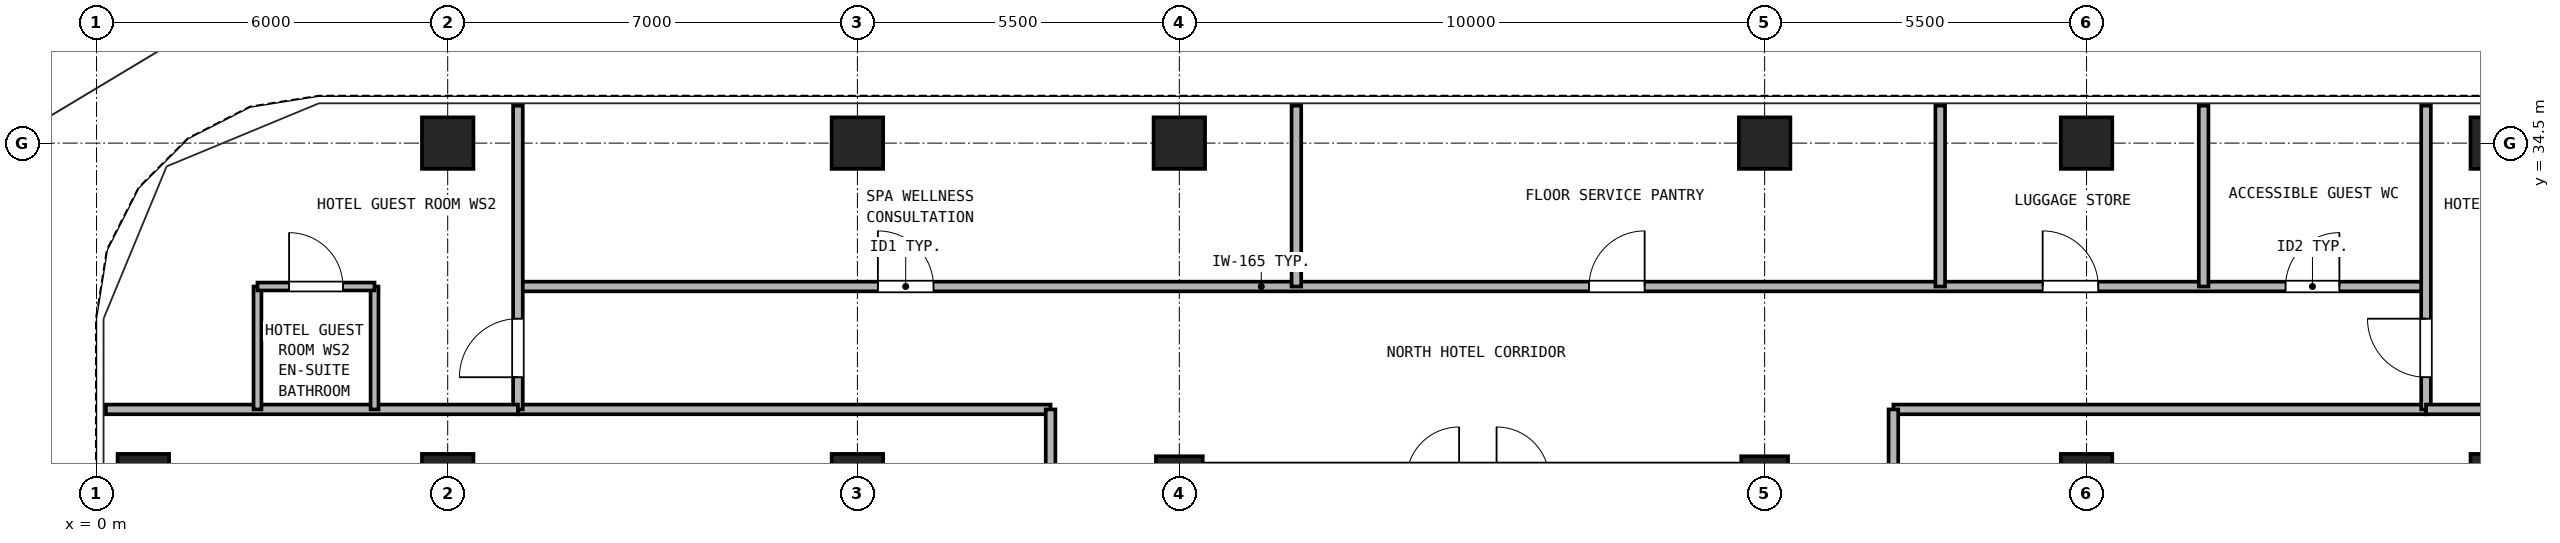
"""IFC4 building model, lengths in metres.
Left out: names, types, materials, properties, quantities, classifications, styles, units other than length and angle.
Written with IfcOpenShell. Run it as: python <this file> out.ifc"""

import sys

from ifc_helpers import new_model, si_unit, direction, frame, frame_2d, origin, origin_2d, place, context, subcontext, project, spatial, rectangle, hollow_rectangle, extrude, source, transform, mapped, element, fill, save


model = new_model("IFC4")
c1 = context("Model", 3, precision=1e-05, world=origin(), true_north=direction((0.0, 1.0)))
c2 = subcontext(c1, "Body", "Model", "MODEL_VIEW")
j1 = project(units=[si_unit("LENGTHUNIT", "METRE"), si_unit("PLANEANGLEUNIT", "RADIAN")], contexts=[c1])
p1 = place(None, origin())
s1 = spatial("IfcSite", under=j1, at=p1, CompositionType="ELEMENT")
p2 = place(p1, origin())
s2 = spatial("IfcBuilding", under=s1, at=p2, CompositionType="ELEMENT")
p3 = place(p2, frame((0.0, 0.0, 118.3)))
s3 = spatial("IfcBuildingStorey", under=s2, at=p3, CompositionType="ELEMENT", Elevation=118.3)
m1 = source(origin(), c2, "Body", "SweptSolid", [
    extrude(hollow_rectangle(XDim=0.88, YDim=0.88, WallThickness=0.05, at=origin_2d()), origin(), (0.0, 0.0, 1.0), 2.95),
])
for number, where, z_axis, x_axis in (
    (1, (6.0, 34.5, 0.0), (0.0, 0.0, 1.0), (1.0, 0.0, 0.0)),
    (2, (13.0, 34.5, 0.0), (0.0, 0.0, 1.0), (1.0, 0.0, 0.0)),
    (3, (18.5, 34.5, 0.0), (0.0, 0.0, 1.0), (1.0, 0.0, 0.0)),
    (4, (28.5, 34.5, 0.0), (0.0, 0.0, 1.0), (1.0, 0.0, 0.0)),
    (5, (34.0, 34.5, 0.0), (0.0, 0.0, 1.0), (1.0, 0.0, 0.0)),
    (6, (41.0, 34.5, 0.0), (0.0, 0.0, 1.0), (1.0, 0.0, 0.0)),
    (7, (0.8, 28.75, 0.0), (0.0, 0.0, 1.0), (1.0, 0.0, 0.0)),
    (8, (6.0, 28.75, 0.0), (0.0, 0.0, 1.0), (1.0, 0.0, 0.0)),
    (9, (13.0, 28.75, 0.0), (0.0, 0.0, 1.0), (1.0, 0.0, 0.0)),
):
    element("IfcColumn", number, at=place(p3, frame(where, z_axis=z_axis, x_axis=x_axis)), inside=s3, PredefinedType="COLUMN", context=c2, shape_type="MappedRepresentation", body=[
        mapped(m1, transform((0.0, 0.0, 0.0), x_axis=(1.0, 0.0, 0.0), y_axis=(0.0, 1.0, 0.0), z_axis=(0.0, 0.0, 1.0), scale=1.0)),
    ])
m2 = source(origin(), c2, "Body", "SweptSolid", [
    extrude(hollow_rectangle(XDim=0.8, YDim=0.8, WallThickness=0.045, at=origin_2d()), origin(), (0.0, 0.0, 1.0), 2.95),
])
for number, where, z_axis, x_axis in (
    (10, (18.5, 28.75, 0.0), (0.0, 0.0, 1.0), (1.0, 0.0, 0.0)),
    (11, (28.5, 28.75, 0.0), (0.0, 0.0, 1.0), (1.0, 0.0, 0.0)),
):
    element("IfcColumn", number, at=place(p3, frame(where, z_axis=z_axis, x_axis=x_axis)), inside=s3, PredefinedType="COLUMN", context=c2, shape_type="MappedRepresentation", body=[
        mapped(m2, transform((0.0, 0.0, 0.0), x_axis=(1.0, 0.0, 0.0), y_axis=(0.0, 1.0, 0.0), z_axis=(0.0, 0.0, 1.0), scale=1.0)),
    ])
for number, where, z_axis, x_axis in (
    (12, (34.0, 28.75, 0.0), (0.0, 0.0, 1.0), (1.0, 0.0, 0.0)),
    (13, (41.0, 28.75, 0.0), (0.0, 0.0, 1.0), (1.0, 0.0, 0.0)),
):
    element("IfcColumn", number, at=place(p3, frame(where, z_axis=z_axis, x_axis=x_axis)), inside=s3, PredefinedType="COLUMN", context=c2, shape_type="MappedRepresentation", body=[
        mapped(m1, transform((0.0, 0.0, 0.0), x_axis=(1.0, 0.0, 0.0), y_axis=(0.0, 1.0, 0.0), z_axis=(0.0, 0.0, 1.0), scale=1.0)),
    ])
p4 = place(p3, frame((7.2, 32.05, 0.0), z_axis=(0.0, 0.0, 1.0), x_axis=(1.0, 0.0, 0.0)))
e14 = element("IfcWall", 14, at=p4, inside=s3, PredefinedType="PARTITIONING", context=c2, shape_type="SweptSolid", body=[
    extrude(rectangle(XDim=32.6, YDim=0.165, at=frame_2d((16.3, 0.0))), origin(), (0.0, 0.0, 1.0), 2.95),
])
p5 = place(p4, frame((6.15, 0.0, 0.0)))
e15 = element("IfcOpeningElement", 15, at=p5, cuts=e14, PredefinedType="OPENING", context=c2, shape_type="SweptSolid", body=[
    extrude(rectangle(XDim=0.95, YDim=2.15, at=frame_2d((0.475, 1.075))), frame((0.0, 0.093, 0.0), z_axis=(0.0, -1.0, 0.0), x_axis=(1.0, 0.0, 0.0)), (0.0, 0.0, 1.0), 0.185),
])
p6 = place(p4, frame((18.3, 0.0, 0.0)))
e16 = element("IfcOpeningElement", 16, at=p6, cuts=e14, PredefinedType="OPENING", context=c2, shape_type="SweptSolid", body=[
    extrude(rectangle(XDim=0.95, YDim=2.15, at=frame_2d((0.475, 1.075))), frame((0.0, 0.093, 0.0), z_axis=(0.0, -1.0, 0.0), x_axis=(1.0, 0.0, 0.0)), (0.0, 0.0, 1.0), 0.185),
])
p7 = place(p4, frame((26.05, 0.0, 0.0)))
e17 = element("IfcOpeningElement", 17, at=p7, cuts=e14, PredefinedType="OPENING", context=c2, shape_type="SweptSolid", body=[
    extrude(rectangle(XDim=0.95, YDim=2.15, at=frame_2d((0.475, 1.075))), frame((0.0, 0.093, 0.0), z_axis=(0.0, -1.0, 0.0), x_axis=(1.0, 0.0, 0.0)), (0.0, 0.0, 1.0), 0.185),
])
p8 = place(p4, frame((30.2, 0.0, 0.0)))
e18 = element("IfcOpeningElement", 18, at=p8, cuts=e14, PredefinedType="OPENING", context=c2, shape_type="SweptSolid", body=[
    extrude(rectangle(XDim=0.92, YDim=2.1, at=frame_2d((0.46, 1.05))), frame((0.0, 0.093, 0.0), z_axis=(0.0, -1.0, 0.0), x_axis=(1.0, 0.0, 0.0)), (0.0, 0.0, 1.0), 0.185),
])
for number, where, z_axis, x_axis in (
    (19, (7.2, 29.95, 0.0), (0.0, 0.0, 1.0), (1.0, 0.0, 0.0)),
    (20, (30.7, 29.95, 0.0), (0.0, 0.0, 1.0), (1.0, 0.0, 0.0)),
):
    element("IfcWall", number, at=place(p3, frame(where, z_axis=z_axis, x_axis=x_axis)), inside=s3, PredefinedType="PARTITIONING", context=c2, shape_type="SweptSolid", body=[
        extrude(rectangle(XDim=9.1, YDim=0.165, at=frame_2d((4.55, 0.0))), origin(), (0.0, 0.0, 1.0), 2.95),
    ])
p9 = place(p3, frame((16.3, 11.2, 0.0), z_axis=(0.0, 0.0, 1.0), x_axis=(0.0, 1.0, 0.0)))
e21 = element("IfcWall", 21, at=p9, inside=s3, PredefinedType="PARTITIONING", context=c2, shape_type="SweptSolid", body=[
    extrude(rectangle(XDim=18.75, YDim=0.165, at=frame_2d((9.375, 0.0))), origin(), (0.0, 0.0, 1.0), 2.95),
])
p10 = place(p9, frame((8.875, 0.0, 0.0)))
e22 = element("IfcOpeningElement", 22, at=p10, cuts=e21, PredefinedType="OPENING", context=c2, shape_type="SweptSolid", body=[
    extrude(rectangle(XDim=0.95, YDim=2.15, at=frame_2d((0.475, 1.075))), frame((0.0, 0.093, 0.0), z_axis=(0.0, -1.0, 0.0), x_axis=(1.0, 0.0, 0.0)), (0.0, 0.0, 1.0), 0.185),
])
p11 = place(p3, frame((30.7, 11.2, 0.0), z_axis=(0.0, 0.0, 1.0), x_axis=(0.0, 1.0, 0.0)))
e23 = element("IfcWall", 23, at=p11, inside=s3, PredefinedType="PARTITIONING", context=c2, shape_type="SweptSolid", body=[
    extrude(rectangle(XDim=18.75, YDim=0.165, at=frame_2d((9.375, 0.0))), origin(), (0.0, 0.0, 1.0), 2.95),
])
p12 = place(p11, frame((2.6, 0.0, 0.0)))
e24 = element("IfcOpeningElement", 24, at=p12, cuts=e23, PredefinedType="OPENING", context=c2, shape_type="SweptSolid", body=[
    extrude(rectangle(XDim=0.95, YDim=2.15, at=frame_2d((0.475, 1.075))), frame((0.0, 0.093, 0.0), z_axis=(0.0, -1.0, 0.0), x_axis=(1.0, 0.0, 0.0)), (0.0, 0.0, 1.0), 0.185),
])
p13 = place(p11, frame((8.8, 0.0, 0.0)))
e25 = element("IfcOpeningElement", 25, at=p13, cuts=e23, PredefinedType="OPENING", context=c2, shape_type="SweptSolid", body=[
    extrude(rectangle(XDim=0.95, YDim=2.15, at=frame_2d((0.475, 1.075))), frame((0.0, 0.093, 0.0), z_axis=(0.0, -1.0, 0.0), x_axis=(1.0, 0.0, 0.0)), (0.0, 0.0, 1.0), 0.185),
])
p14 = place(p11, frame((15.075, 0.0, 0.0)))
e26 = element("IfcOpeningElement", 26, at=p14, cuts=e23, PredefinedType="OPENING", context=c2, shape_type="SweptSolid", body=[
    extrude(rectangle(XDim=0.95, YDim=2.15, at=frame_2d((0.475, 1.075))), frame((0.0, 0.093, 0.0), z_axis=(0.0, -1.0, 0.0), x_axis=(1.0, 0.0, 0.0)), (0.0, 0.0, 1.0), 0.185),
])
p15 = place(p3, frame((7.2, 29.95, 0.0), z_axis=(0.0, 0.0, 1.0), x_axis=(0.0, 1.0, 0.0)))
e27 = element("IfcWall", 27, at=p15, inside=s3, PredefinedType="PARTITIONING", context=c2, shape_type="SweptSolid", body=[
    extrude(rectangle(XDim=5.19, YDim=0.165, at=frame_2d((2.595, 0.0))), origin(), (0.0, 0.0, 1.0), 2.95),
])
p16 = place(p15, frame((0.55, 0.0, 0.0)))
e28 = element("IfcOpeningElement", 28, at=p16, cuts=e27, PredefinedType="OPENING", context=c2, shape_type="SweptSolid", body=[
    extrude(rectangle(XDim=1.0, YDim=2.15, at=frame_2d((0.5, 1.075))), frame((0.0, 0.093, 0.0), z_axis=(0.0, -1.0, 0.0), x_axis=(1.0, 0.0, 0.0)), (0.0, 0.0, 1.0), 0.185),
])
p17 = place(p3, frame((39.8, 29.95, 0.0), z_axis=(0.0, 0.0, 1.0), x_axis=(0.0, 1.0, 0.0)))
e29 = element("IfcWall", 29, at=p17, inside=s3, PredefinedType="PARTITIONING", context=c2, shape_type="SweptSolid", body=[
    extrude(rectangle(XDim=5.19, YDim=0.165, at=frame_2d((2.595, 0.0))), origin(), (0.0, 0.0, 1.0), 2.95),
])
p18 = place(p17, frame((0.55, 0.0, 0.0)))
e30 = element("IfcOpeningElement", 30, at=p18, cuts=e29, PredefinedType="OPENING", context=c2, shape_type="SweptSolid", body=[
    extrude(rectangle(XDim=1.0, YDim=2.15, at=frame_2d((0.5, 1.075))), frame((0.0, 0.093, 0.0), z_axis=(0.0, -1.0, 0.0), x_axis=(1.0, 0.0, 0.0)), (0.0, 0.0, 1.0), 0.185),
])
for number, where, z_axis, x_axis in (
    (31, (0.16, 29.95, 0.0), (0.0, 0.0, 1.0), (1.0, 0.0, 0.0)),
    (32, (39.8, 29.95, 0.0), (0.0, 0.0, 1.0), (1.0, 0.0, 0.0)),
):
    element("IfcWall", number, at=place(p3, frame(where, z_axis=z_axis, x_axis=x_axis)), inside=s3, PredefinedType="PARTITIONING", context=c2, shape_type="SweptSolid", body=[
        extrude(rectangle(XDim=7.04, YDim=0.165, at=frame_2d((3.52, 0.0))), origin(), (0.0, 0.0, 1.0), 2.95),
    ])
for number, where, z_axis, x_axis in (
    (33, (2.75, 29.95, 0.0), (0.0, 0.0, 1.0), (0.0, 1.0, 0.0)),
    (34, (4.75, 29.95, 0.0), (0.0, 0.0, 1.0), (0.0, 1.0, 0.0)),
):
    element("IfcWall", number, at=place(p3, frame(where, z_axis=z_axis, x_axis=x_axis)), inside=s3, PredefinedType="PARTITIONING", context=c2, shape_type="SweptSolid", body=[
        extrude(rectangle(XDim=2.1, YDim=0.135, at=frame_2d((1.05, 0.0))), origin(), (0.0, 0.0, 1.0), 2.95),
    ])
p19 = place(p3, frame((2.75, 32.05, 0.0), z_axis=(0.0, 0.0, 1.0), x_axis=(1.0, 0.0, 0.0)))
e35 = element("IfcWall", 35, at=p19, inside=s3, PredefinedType="PARTITIONING", context=c2, shape_type="SweptSolid", body=[
    extrude(rectangle(XDim=2.0, YDim=0.135, at=frame_2d((1.0, 0.0))), origin(), (0.0, 0.0, 1.0), 2.95),
])
p20 = place(p19, frame((0.54, 0.0, 0.0)))
e36 = element("IfcOpeningElement", 36, at=p20, cuts=e35, PredefinedType="OPENING", context=c2, shape_type="SweptSolid", body=[
    extrude(rectangle(XDim=0.92, YDim=2.1, at=frame_2d((0.46, 1.05))), frame((0.0, 0.077, 0.0), z_axis=(0.0, -1.0, 0.0), x_axis=(1.0, 0.0, 0.0)), (0.0, 0.0, 1.0), 0.155),
])
for number, where, z_axis, x_axis in (
    (37, (20.5, 32.05, 0.0), (0.0, 0.0, 1.0), (0.0, 1.0, 0.0)),
    (38, (31.5, 32.05, 0.0), (0.0, 0.0, 1.0), (0.0, 1.0, 0.0)),
    (39, (36.0, 32.05, 0.0), (0.0, 0.0, 1.0), (0.0, 1.0, 0.0)),
):
    element("IfcWall", number, at=place(p3, frame(where, z_axis=z_axis, x_axis=x_axis)), inside=s3, PredefinedType="PARTITIONING", context=c2, shape_type="SweptSolid", body=[
        extrude(rectangle(XDim=3.09, YDim=0.165, at=frame_2d((1.545, 0.0))), origin(), (0.0, 0.0, 1.0), 2.95),
    ])
p21 = place(p20, frame((0.92, 0.0, 0.0), z_axis=(0.0, 0.0, 1.0), x_axis=(-1.0, 0.0, 0.0)))
e40 = element("IfcDoor", 40, at=p21, inside=s3, OperationType="SINGLE_SWING_LEFT", PredefinedType="DOOR", context=c2, shape_type="SweptSolid", body=[
    extrude(rectangle(XDim=0.92, YDim=2.1, at=frame_2d((0.46, 1.05))), frame((0.0, 0.025, 0.0), z_axis=(0.0, -1.0, 0.0), x_axis=(1.0, 0.0, 0.0)), (0.0, 0.0, 1.0), 0.05),
])
fill(e36, e40)
p22 = place(p16, origin())
e41 = element("IfcDoor", 41, at=p22, inside=s3, OperationType="SINGLE_SWING_LEFT", PredefinedType="DOOR", context=c2, shape_type="SweptSolid", body=[
    extrude(rectangle(XDim=1.0, YDim=2.15, at=frame_2d((0.5, 1.075))), frame((0.0, 0.025, 0.0), z_axis=(0.0, -1.0, 0.0), x_axis=(1.0, 0.0, 0.0)), (0.0, 0.0, 1.0), 0.05),
])
fill(e28, e41)
p23 = place(p18, frame((1.0, 0.0, 0.0), z_axis=(0.0, 0.0, 1.0), x_axis=(-1.0, 0.0, 0.0)))
e42 = element("IfcDoor", 42, at=p23, inside=s3, OperationType="SINGLE_SWING_RIGHT", PredefinedType="DOOR", context=c2, shape_type="SweptSolid", body=[
    extrude(rectangle(XDim=1.0, YDim=2.15, at=frame_2d((0.5, 1.075))), frame((0.0, 0.025, 0.0), z_axis=(0.0, -1.0, 0.0), x_axis=(1.0, 0.0, 0.0)), (0.0, 0.0, 1.0), 0.05),
])
fill(e30, e42)
p24 = place(p5, origin())
e43 = element("IfcDoor", 43, at=p24, inside=s3, OperationType="SINGLE_SWING_LEFT", PredefinedType="DOOR", context=c2, shape_type="SweptSolid", body=[
    extrude(rectangle(XDim=0.95, YDim=2.15, at=frame_2d((0.475, 1.075))), frame((0.0, 0.025, 0.0), z_axis=(0.0, -1.0, 0.0), x_axis=(1.0, 0.0, 0.0)), (0.0, 0.0, 1.0), 0.05),
])
fill(e15, e43)
p25 = place(p6, origin())
e44 = element("IfcDoor", 44, at=p25, inside=s3, OperationType="SINGLE_SWING_RIGHT", PredefinedType="DOOR", context=c2, shape_type="SweptSolid", body=[
    extrude(rectangle(XDim=0.95, YDim=2.15, at=frame_2d((0.475, 1.075))), frame((0.0, 0.025, 0.0), z_axis=(0.0, -1.0, 0.0), x_axis=(1.0, 0.0, 0.0)), (0.0, 0.0, 1.0), 0.05),
])
fill(e16, e44)
p26 = place(p7, origin())
e45 = element("IfcDoor", 45, at=p26, inside=s3, OperationType="SINGLE_SWING_LEFT", PredefinedType="DOOR", context=c2, shape_type="SweptSolid", body=[
    extrude(rectangle(XDim=0.95, YDim=2.15, at=frame_2d((0.475, 1.075))), frame((0.0, 0.025, 0.0), z_axis=(0.0, -1.0, 0.0), x_axis=(1.0, 0.0, 0.0)), (0.0, 0.0, 1.0), 0.05),
])
fill(e17, e45)
p27 = place(p8, origin())
e46 = element("IfcDoor", 46, at=p27, inside=s3, OperationType="SINGLE_SWING_RIGHT", PredefinedType="DOOR", context=c2, shape_type="SweptSolid", body=[
    extrude(rectangle(XDim=0.92, YDim=2.1, at=frame_2d((0.46, 1.05))), frame((0.0, 0.025, 0.0), z_axis=(0.0, -1.0, 0.0), x_axis=(1.0, 0.0, 0.0)), (0.0, 0.0, 1.0), 0.05),
])
fill(e18, e46)
save(model, sys.argv[1])
